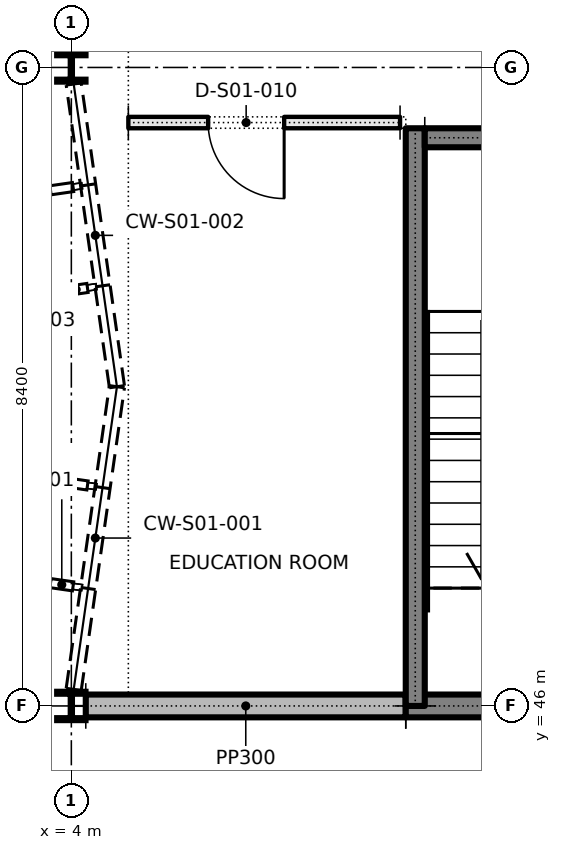
"""IFC4 building model, lengths in metres.
Left out: names, types, materials, properties, quantities, classifications, styles, units other than length and angle.
Written with IfcOpenShell. Run it as: python <this file> out.ifc"""

import sys

from ifc_helpers import new_model, si_unit, direction, frame, frame_2d, origin, origin_2d, place, context, subcontext, project, spatial, rectangle, i_section, extrude, element, fill, save


model = new_model("IFC4")
c1 = context("Model", 3, precision=1e-05, world=origin(), true_north=direction((0.0, 1.0)))
c2 = subcontext(c1, "Body", "Model", "MODEL_VIEW")
j1 = project(units=[si_unit("LENGTHUNIT", "METRE"), si_unit("PLANEANGLEUNIT", "RADIAN")], contexts=[c1])
p1 = place(None, origin())
s1 = spatial("IfcSite", under=j1, at=p1, CompositionType="ELEMENT")
p2 = place(p1, origin())
s2 = spatial("IfcBuilding", under=s1, at=p2, CompositionType="ELEMENT")
p3 = place(p2, frame((0.0, 0.0, 5.4)))
s3 = spatial("IfcBuildingStorey", under=s2, at=p3, CompositionType="ELEMENT", Elevation=5.4)
for number, where, z_axis, x_axis in (
    (1, (4.0, 46.0, 0.0), (0.0, 0.0, 1.0), (1.0, 0.0, 0.0)),
    (2, (4.0, 54.4, 0.0), (0.0, 0.0, 1.0), (1.0, 0.0, 0.0)),
):
    element("IfcColumn", number, at=place(p3, frame(where, z_axis=z_axis, x_axis=x_axis)), inside=s3, PredefinedType="COLUMN", context=c2, shape_type="SweptSolid", body=[
        extrude(i_section(OverallWidth=0.373, OverallDepth=0.373, WebThickness=0.016, FlangeThickness=0.026, FilletRadius=0.015, at=origin_2d()), origin(), (0.0, 0.0, 1.0), 4.8),
    ])
p4 = place(p3, frame((4.19, 46.0, 0.0), z_axis=(0.0, 0.0, 1.0), x_axis=(1.0, 0.0, 0.0)))
e3 = element("IfcWall", 3, at=p4, inside=s3, PredefinedType="SOLIDWALL", context=c2, shape_type="SweptSolid", body=[
    extrude(rectangle(XDim=4.21, YDim=0.3, at=frame_2d((2.105, 0.0))), origin(), (0.0, 0.0, 1.0), 4.008),
])
p5 = place(p3, frame((8.4, 46.0, 0.0), z_axis=(0.0, 0.0, 1.0), x_axis=(1.0, 0.0, 0.0)))
e4 = element("IfcWall", 4, at=p5, inside=s3, PredefinedType="SOLIDWALL", context=c2, shape_type="SweptSolid", body=[
    extrude(rectangle(XDim=3.775, YDim=0.3, at=frame_2d((1.888, 0.0))), origin(), (0.0, 0.0, 1.0), 4.8),
])
p6 = place(p3, frame((8.525, 46.0, 0.0), z_axis=(0.0, 0.0, 1.0), x_axis=(0.0, 1.0, 0.0)))
e5 = element("IfcWall", 5, at=p6, inside=s3, PredefinedType="SHEAR", context=c2, shape_type="SweptSolid", body=[
    extrude(rectangle(XDim=7.6, YDim=0.25, at=frame_2d((3.8, 0.0))), origin(), (0.0, 0.0, 1.0), 4.8),
])
p7 = place(p3, frame((8.65, 53.475, 0.0), z_axis=(0.0, 0.0, 1.0), x_axis=(1.0, 0.0, 0.0)))
e6 = element("IfcWall", 6, at=p7, inside=s3, PredefinedType="SHEAR", context=c2, shape_type="SweptSolid", body=[
    extrude(rectangle(XDim=3.25, YDim=0.25, at=frame_2d((1.625, 0.0))), origin(), (0.0, 0.0, 1.0), 4.8),
])
p8 = place(p3, frame((4.75, 53.675, 0.0), z_axis=(0.0, 0.0, 1.0), x_axis=(1.0, 0.0, 0.0)))
e7 = element("IfcWall", 7, at=p8, inside=s3, PredefinedType="PARTITIONING", context=c2, shape_type="SweptSolid", body=[
    extrude(rectangle(XDim=3.575, YDim=0.15, at=frame_2d((1.788, 0.0))), origin(), (0.0, 0.0, 1.0), 4.8),
])
p9 = place(p8, frame((1.05, 0.0, 0.0)))
e8 = element("IfcOpeningElement", 8, at=p9, cuts=e7, PredefinedType="OPENING", context=c2, shape_type="SweptSolid", body=[
    extrude(rectangle(XDim=1.0, YDim=2.1, at=frame_2d((0.5, 1.05))), frame((0.0, 0.085, 0.0), z_axis=(0.0, -1.0, 0.0), x_axis=(1.0, 0.0, 0.0)), (0.0, 0.0, 1.0), 0.17),
])
p10 = place(p9, frame((1.0, 0.0, 0.0), z_axis=(0.0, 0.0, 1.0), x_axis=(-1.0, 0.0, 0.0)))
e9 = element("IfcDoor", 9, at=p10, inside=s3, OperationType="SINGLE_SWING_LEFT", PredefinedType="DOOR", context=c2, shape_type="SweptSolid", body=[
    extrude(rectangle(XDim=1.0, YDim=2.1, at=frame_2d((0.5, 1.05))), frame((0.0, 0.025, 0.0), z_axis=(0.0, -1.0, 0.0), x_axis=(1.0, 0.0, 0.0)), (0.0, 0.0, 1.0), 0.05),
])
fill(e8, e9)
save(model, sys.argv[1])
